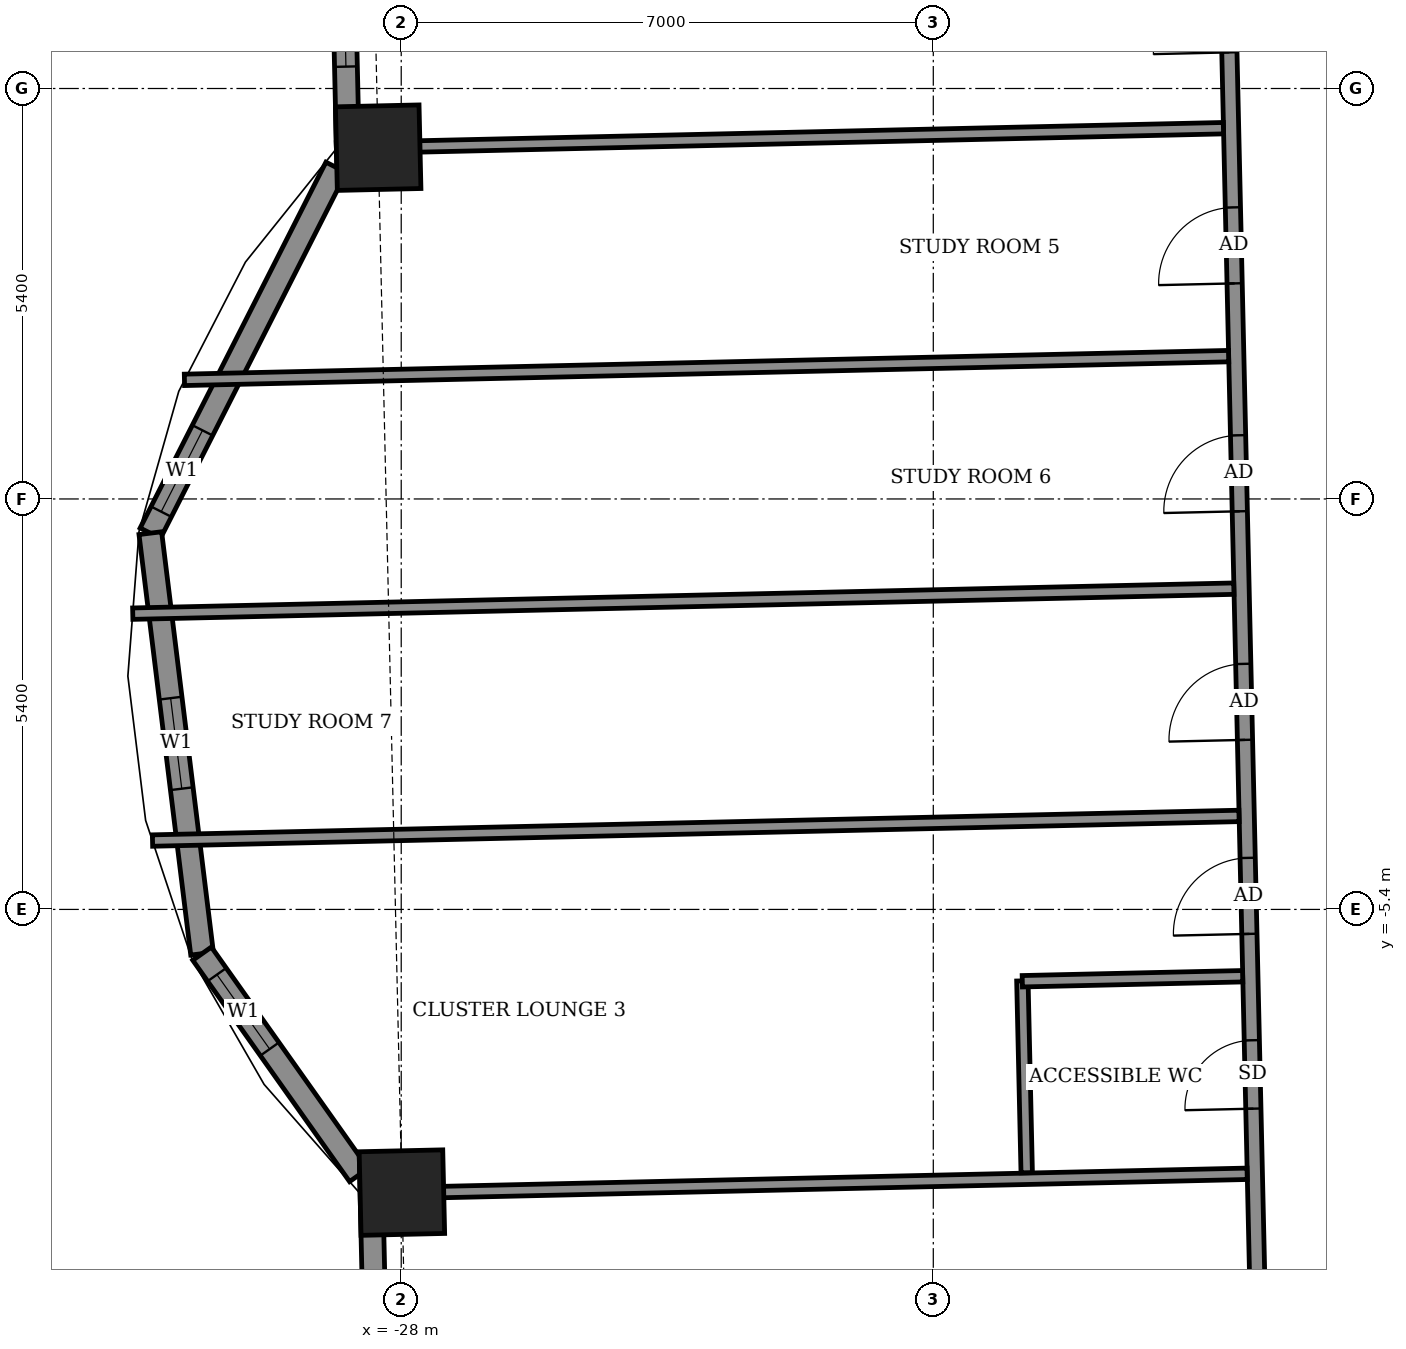
"""IFC4 building model, lengths in metres.
Left out: names, types, materials, properties, quantities, classifications, styles, units other than length and angle.
Written with IfcOpenShell. Run it as: python <this file> out.ifc"""

import sys

from ifc_helpers import new_model, si_unit, direction, frame, frame_2d, origin, origin_2d, place, context, subcontext, project, spatial, rectangle, extrude, element, fill, save


model = new_model("IFC4")
c1 = context("Model", 3, precision=1e-05, world=origin(), true_north=direction((0.0, 1.0)))
c2 = subcontext(c1, "Body", "Model", "MODEL_VIEW")
j1 = project(units=[si_unit("LENGTHUNIT", "METRE"), si_unit("PLANEANGLEUNIT", "RADIAN")], contexts=[c1])
p1 = place(None, origin())
s1 = spatial("IfcSite", under=j1, at=p1, CompositionType="ELEMENT")
p2 = place(p1, origin())
s2 = spatial("IfcBuilding", under=s1, at=p2, CompositionType="ELEMENT")
p3 = place(p2, frame((0.0, 0.0, 238.3)))
s3 = spatial("IfcBuildingStorey", under=s2, at=p3, CompositionType="ELEMENT", Elevation=238.3)
for number, where, z_axis, x_axis in (
    (1, (-27.991, -9.125, -0.55), (0.0, 0.0, 1.0), (0.023, -1.0, 0.0)),
    (2, (-28.303, 4.622, -0.55), (0.0, 0.0, 1.0), (0.023, -1.0, 0.0)),
):
    element("IfcColumn", number, at=place(p3, frame(where, z_axis=z_axis, x_axis=x_axis)), inside=s3, PredefinedType="COLUMN", context=c2, shape_type="SweptSolid", body=[
        extrude(rectangle(XDim=1.1, YDim=1.1, at=origin_2d()), origin(), (0.0, 0.0, 1.0), 3.6),
    ])
p4 = place(p3, frame((-28.979, 16.784, 0.0), z_axis=(0.0, 0.0, 1.0), x_axis=(0.022685159264, -0.999742658662, 0.0)))
e3 = element("IfcWall", 3, at=p4, inside=s3, PredefinedType="SOLIDWALL", context=c2, shape_type="SweptSolid", body=[
    extrude(rectangle(XDim=12.699, YDim=0.3, at=frame_2d((6.35, 0.0))), origin(), (0.0, 0.0, 1.0), 2.55),
])
p5 = place(p4, frame((2.06, 0.0, 0.0)))
e4 = element("IfcOpeningElement", 4, at=p5, cuts=e3, PredefinedType="OPENING", context=c2, shape_type="SweptSolid", body=[
    extrude(rectangle(XDim=1.5, YDim=2.4, at=frame_2d((0.75, 1.2))), frame((0.0, 0.16, 0.0), z_axis=(0.0, -1.0, 0.0), x_axis=(1.0, 0.0, 0.0)), (0.0, 0.0, 1.0), 0.32),
])
p6 = place(p4, frame((7.169, 0.0, 0.9)))
e5 = element("IfcOpeningElement", 5, at=p6, cuts=e3, PredefinedType="OPENING", context=c2, shape_type="SweptSolid", body=[
    extrude(rectangle(XDim=1.2, YDim=1.5, at=frame_2d((0.6, 0.75))), frame((0.0, 0.16, 0.0), z_axis=(0.0, -1.0, 0.0), x_axis=(1.0, 0.0, 0.0)), (0.0, 0.0, 1.0), 0.32),
])
p7 = place(p4, frame((9.899, 0.0, 0.9)))
e6 = element("IfcOpeningElement", 6, at=p7, cuts=e3, PredefinedType="OPENING", context=c2, shape_type="SweptSolid", body=[
    extrude(rectangle(XDim=1.2, YDim=1.5, at=frame_2d((0.6, 0.75))), frame((0.0, 0.16, 0.0), z_axis=(0.0, -1.0, 0.0), x_axis=(1.0, 0.0, 0.0)), (0.0, 0.0, 1.0), 0.32),
])
p8 = place(p3, frame((-28.857, 4.363, 0.0), z_axis=(0.0, 0.0, 1.0), x_axis=(-0.45277700056, -0.891623792731, 0.0)))
e7 = element("IfcWall", 7, at=p8, inside=s3, PredefinedType="SOLIDWALL", context=c2, shape_type="SweptSolid", body=[
    extrude(rectangle(XDim=5.398, YDim=0.3, at=frame_2d((2.699, 0.0))), origin(), (0.0, 0.0, 1.0), 3.05),
])
p9 = place(p8, frame((3.881, 0.0, 0.9)))
e8 = element("IfcOpeningElement", 8, at=p9, cuts=e7, PredefinedType="OPENING", context=c2, shape_type="SweptSolid", body=[
    extrude(rectangle(XDim=1.2, YDim=1.5, at=frame_2d((0.6, 0.75))), frame((0.0, 0.16, 0.0), z_axis=(0.0, -1.0, 0.0), x_axis=(1.0, 0.0, 0.0)), (0.0, 0.0, 1.0), 0.32),
])
p10 = place(p3, frame((-31.301, -0.45, 0.0), z_axis=(0.0, 0.0, 1.0), x_axis=(0.122163831021, -0.992509948761, 0.0)))
e9 = element("IfcWall", 9, at=p10, inside=s3, PredefinedType="SOLIDWALL", context=c2, shape_type="SweptSolid", body=[
    extrude(rectangle(XDim=5.574, YDim=0.3, at=frame_2d((2.787, 0.0))), origin(), (0.0, 0.0, 1.0), 3.05),
])
p11 = place(p10, frame((2.187, 0.0, 0.9)))
e10 = element("IfcOpeningElement", 10, at=p11, cuts=e9, PredefinedType="OPENING", context=c2, shape_type="SweptSolid", body=[
    extrude(rectangle(XDim=1.2, YDim=1.5, at=frame_2d((0.6, 0.75))), frame((0.0, 0.16, 0.0), z_axis=(0.0, -1.0, 0.0), x_axis=(1.0, 0.0, 0.0)), (0.0, 0.0, 1.0), 0.32),
])
p12 = place(p3, frame((-30.62, -5.982, 0.0), z_axis=(0.0, 0.0, 1.0), x_axis=(0.578108441206, -0.815959943996, 0.0)))
e11 = element("IfcWall", 11, at=p12, inside=s3, PredefinedType="SOLIDWALL", context=c2, shape_type="SweptSolid", body=[
    extrude(rectangle(XDim=3.569, YDim=0.3, at=frame_2d((1.784, 0.0))), origin(), (0.0, 0.0, 1.0), 3.05),
])
p13 = place(p12, frame((0.338, 0.0, 0.9)))
e12 = element("IfcOpeningElement", 12, at=p13, cuts=e11, PredefinedType="OPENING", context=c2, shape_type="SweptSolid", body=[
    extrude(rectangle(XDim=1.2, YDim=1.5, at=frame_2d((0.6, 0.75))), frame((0.0, 0.16, 0.0), z_axis=(0.0, -1.0, 0.0), x_axis=(1.0, 0.0, 0.0)), (0.0, 0.0, 1.0), 0.32),
])
p14 = place(p3, frame((-28.403, -8.61, 0.0), z_axis=(0.0, 0.0, 1.0), x_axis=(0.022680342038, -0.999742767958, 0.0)))
e13 = element("IfcWall", 13, at=p14, inside=s3, PredefinedType="SOLIDWALL", context=c2, shape_type="SweptSolid", body=[
    extrude(rectangle(XDim=13.1, YDim=0.3, at=frame_2d((6.55, 0.0))), origin(), (0.0, 0.0, 1.0), 2.55),
])
p15 = place(p14, frame((1.95, 0.0, 0.0)))
e14 = element("IfcOpeningElement", 14, at=p15, cuts=e13, PredefinedType="OPENING", context=c2, shape_type="SweptSolid", body=[
    extrude(rectangle(XDim=1.5, YDim=2.4, at=frame_2d((0.75, 1.2))), frame((0.0, 0.16, 0.0), z_axis=(0.0, -1.0, 0.0), x_axis=(1.0, 0.0, 0.0)), (0.0, 0.0, 1.0), 0.32),
])
p16 = place(p14, frame((8.599, 0.0, 0.9)))
e15 = element("IfcOpeningElement", 15, at=p16, cuts=e13, PredefinedType="OPENING", context=c2, shape_type="SweptSolid", body=[
    extrude(rectangle(XDim=2.4, YDim=1.5, at=frame_2d((1.2, 0.75))), frame((0.0, 0.16, 0.0), z_axis=(0.0, -1.0, 0.0), x_axis=(1.0, 0.0, 0.0)), (0.0, 0.0, 1.0), 0.32),
])
p17 = place(p3, frame((-31.084, -12.322, 0.0), z_axis=(0.0, 0.0, 1.0), x_axis=(-0.022929749512, 0.99973707873, 0.0)))
e16 = element("IfcWall", 16, at=p17, inside=s3, PredefinedType="USERDEFINED", context=c2, shape_type="SweptSolid", body=[
    extrude(rectangle(XDim=2.875, YDim=0.55, at=frame_2d((1.438, 0.0))), origin(), (0.0, 0.0, 1.0), 0.8),
])
p18 = place(p3, frame((-16.678, -12.919, 0.0), z_axis=(0.0, 0.0, 1.0), x_axis=(-0.022696191528, 0.999742408268, 0.0)))
e17 = element("IfcWall", 17, at=p18, inside=s3, PredefinedType="PARTITIONING", context=c2, shape_type="SweptSolid", body=[
    extrude(rectangle(XDim=25.074, YDim=0.2, at=frame_2d((12.537, 0.0))), origin(), (0.0, 0.0, 1.0), 3.05),
])
p19 = place(p18, frame((21.237, 0.0, 0.0)))
e18 = element("IfcOpeningElement", 18, at=p19, cuts=e17, PredefinedType="OPENING", context=c2, shape_type="SweptSolid", body=[
    extrude(rectangle(XDim=1.0, YDim=2.1, at=frame_2d((0.5, 1.05))), frame((0.0, 0.11, 0.0), z_axis=(0.0, -1.0, 0.0), x_axis=(1.0, 0.0, 0.0)), (0.0, 0.0, 1.0), 0.22),
])
p20 = place(p18, frame((23.424, 0.0, 0.0)))
e19 = element("IfcOpeningElement", 19, at=p20, cuts=e17, PredefinedType="OPENING", context=c2, shape_type="SweptSolid", body=[
    extrude(rectangle(XDim=0.9, YDim=2.1, at=frame_2d((0.45, 1.05))), frame((0.0, 0.11, 0.0), z_axis=(0.0, -1.0, 0.0), x_axis=(1.0, 0.0, 0.0)), (0.0, 0.0, 1.0), 0.22),
])
p21 = place(p18, frame((18.799, 0.0, 0.0)))
e20 = element("IfcOpeningElement", 20, at=p21, cuts=e17, PredefinedType="OPENING", context=c2, shape_type="SweptSolid", body=[
    extrude(rectangle(XDim=1.0, YDim=2.1, at=frame_2d((0.5, 1.05))), frame((0.0, 0.11, 0.0), z_axis=(0.0, -1.0, 0.0), x_axis=(1.0, 0.0, 0.0)), (0.0, 0.0, 1.0), 0.22),
])
p22 = place(p18, frame((15.759, 0.0, 0.0)))
e21 = element("IfcOpeningElement", 21, at=p22, cuts=e17, PredefinedType="OPENING", context=c2, shape_type="SweptSolid", body=[
    extrude(rectangle(XDim=1.0, YDim=2.1, at=frame_2d((0.5, 1.05))), frame((0.0, 0.11, 0.0), z_axis=(0.0, -1.0, 0.0), x_axis=(1.0, 0.0, 0.0)), (0.0, 0.0, 1.0), 0.22),
])
p23 = place(p18, frame((12.76, 0.0, 0.0)))
e22 = element("IfcOpeningElement", 22, at=p23, cuts=e17, PredefinedType="OPENING", context=c2, shape_type="SweptSolid", body=[
    extrude(rectangle(XDim=1.0, YDim=2.1, at=frame_2d((0.5, 1.05))), frame((0.0, 0.11, 0.0), z_axis=(0.0, -1.0, 0.0), x_axis=(1.0, 0.0, 0.0)), (0.0, 0.0, 1.0), 0.22),
])
p24 = place(p18, frame((9.752, 0.0, 0.0)))
e23 = element("IfcOpeningElement", 23, at=p24, cuts=e17, PredefinedType="OPENING", context=c2, shape_type="SweptSolid", body=[
    extrude(rectangle(XDim=1.0, YDim=2.1, at=frame_2d((0.5, 1.05))), frame((0.0, 0.11, 0.0), z_axis=(0.0, -1.0, 0.0), x_axis=(1.0, 0.0, 0.0)), (0.0, 0.0, 1.0), 0.22),
])
p25 = place(p18, frame((7.199, 0.0, 0.0)))
e24 = element("IfcOpeningElement", 24, at=p25, cuts=e17, PredefinedType="OPENING", context=c2, shape_type="SweptSolid", body=[
    extrude(rectangle(XDim=1.0, YDim=2.1, at=frame_2d((0.5, 1.05))), frame((0.0, 0.11, 0.0), z_axis=(0.0, -1.0, 0.0), x_axis=(1.0, 0.0, 0.0)), (0.0, 0.0, 1.0), 0.22),
])
p26 = place(p18, frame((4.899, 0.0, 0.0)))
e25 = element("IfcOpeningElement", 25, at=p26, cuts=e17, PredefinedType="OPENING", context=c2, shape_type="SweptSolid", body=[
    extrude(rectangle(XDim=0.9, YDim=2.1, at=frame_2d((0.45, 1.05))), frame((0.0, 0.11, 0.0), z_axis=(0.0, -1.0, 0.0), x_axis=(1.0, 0.0, 0.0)), (0.0, 0.0, 1.0), 0.22),
])
p27 = place(p3, frame((-28.241, -9.136, 0.0), z_axis=(0.0, 0.0, 1.0), x_axis=(0.999742533279, 0.022690684282, 0.0)))
e26 = element("IfcWall", 26, at=p27, inside=s3, PredefinedType="PARTITIONING", context=c2, shape_type="SweptSolid", body=[
    extrude(rectangle(XDim=11.373, YDim=0.15, at=frame_2d((5.687, 0.0))), origin(), (0.0, 0.0, 1.0), 3.05),
])
p28 = place(p3, frame((-19.771, -8.864, 0.0), z_axis=(0.0, 0.0, 1.0), x_axis=(-0.022532486354, 0.9997461113, 0.0)))
e27 = element("IfcWall", 27, at=p28, inside=s3, PredefinedType="PARTITIONING", context=c2, shape_type="SweptSolid", body=[
    extrude(rectangle(XDim=2.525, YDim=0.15, at=frame_2d((1.262, 0.0))), origin(), (0.0, 0.0, 1.0), 3.05),
])
p29 = place(p3, frame((-19.829, -6.345, 0.0), z_axis=(0.0, 0.0, 1.0), x_axis=(0.999741618182, 0.022730967319, 0.0)))
e28 = element("IfcWall", 28, at=p29, inside=s3, PredefinedType="PARTITIONING", context=c2, shape_type="SweptSolid", body=[
    extrude(rectangle(XDim=2.9, YDim=0.15, at=frame_2d((1.45, 0.0))), origin(), (0.0, 0.0, 1.0), 3.05),
])
p30 = place(p3, frame((-31.272, -4.494, 0.0), z_axis=(0.0, 0.0, 1.0), x_axis=(0.999743244098, 0.022659344212, 0.0)))
e29 = element("IfcWall", 29, at=p30, inside=s3, PredefinedType="PARTITIONING", context=c2, shape_type="SweptSolid", body=[
    extrude(rectangle(XDim=14.298, YDim=0.15, at=frame_2d((7.149, 0.0))), origin(), (0.0, 0.0, 1.0), 2.1),
])
p31 = place(p3, frame((-31.532, -1.509, 0.0), z_axis=(0.0, 0.0, 1.0), x_axis=(0.999742035573, 0.022712602409, 0.0)))
e30 = element("IfcWall", 30, at=p31, inside=s3, PredefinedType="PARTITIONING", context=c2, shape_type="SweptSolid", body=[
    extrude(rectangle(XDim=14.49, YDim=0.15, at=frame_2d((7.245, 0.0))), origin(), (0.0, 0.0, 1.0), 2.1),
])
p32 = place(p3, frame((-30.852, 1.567, 0.0), z_axis=(0.0, 0.0, 1.0), x_axis=(0.999742156495, 0.022707279151, 0.0)))
e31 = element("IfcWall", 31, at=p32, inside=s3, PredefinedType="PARTITIONING", context=c2, shape_type="SweptSolid", body=[
    extrude(rectangle(XDim=13.741, YDim=0.15, at=frame_2d((6.87, 0.0))), origin(), (0.0, 0.0, 1.0), 2.1),
])
p33 = place(p3, frame((-28.853, 4.613, 0.0), z_axis=(0.0, 0.0, 1.0), x_axis=(0.999742483, 0.022692899457, 0.0)))
e32 = element("IfcWall", 32, at=p33, inside=s3, PredefinedType="PARTITIONING", context=c2, shape_type="SweptSolid", body=[
    extrude(rectangle(XDim=11.673, YDim=0.15, at=frame_2d((5.836, 0.0))), origin(), (0.0, 0.0, 1.0), 3.05),
])
p34 = place(p7, origin())
e33 = element("IfcWindow", 33, at=p34, inside=s3, PartitioningType="SINGLE_PANEL", PredefinedType="WINDOW", context=c2, shape_type="SweptSolid", body=[
    extrude(rectangle(XDim=1.2, YDim=1.5, at=frame_2d((0.6, 0.75))), frame((0.0, 0.03, 0.0), z_axis=(0.0, -1.0, 0.0), x_axis=(1.0, 0.0, 0.0)), (0.0, 0.0, 1.0), 0.06),
])
fill(e6, e33)
p35 = place(p9, origin())
e34 = element("IfcWindow", 34, at=p35, inside=s3, PartitioningType="SINGLE_PANEL", PredefinedType="WINDOW", context=c2, shape_type="SweptSolid", body=[
    extrude(rectangle(XDim=1.2, YDim=1.5, at=frame_2d((0.6, 0.75))), frame((0.0, 0.03, 0.0), z_axis=(0.0, -1.0, 0.0), x_axis=(1.0, 0.0, 0.0)), (0.0, 0.0, 1.0), 0.06),
])
fill(e8, e34)
p36 = place(p11, origin())
e35 = element("IfcWindow", 35, at=p36, inside=s3, PartitioningType="SINGLE_PANEL", PredefinedType="WINDOW", context=c2, shape_type="SweptSolid", body=[
    extrude(rectangle(XDim=1.2, YDim=1.5, at=frame_2d((0.6, 0.75))), frame((0.0, 0.03, 0.0), z_axis=(0.0, -1.0, 0.0), x_axis=(1.0, 0.0, 0.0)), (0.0, 0.0, 1.0), 0.06),
])
fill(e10, e35)
p37 = place(p13, origin())
e36 = element("IfcWindow", 36, at=p37, inside=s3, PartitioningType="SINGLE_PANEL", PredefinedType="WINDOW", context=c2, shape_type="SweptSolid", body=[
    extrude(rectangle(XDim=1.2, YDim=1.5, at=frame_2d((0.6, 0.75))), frame((0.0, 0.03, 0.0), z_axis=(0.0, -1.0, 0.0), x_axis=(1.0, 0.0, 0.0)), (0.0, 0.0, 1.0), 0.06),
])
fill(e12, e36)
p38 = place(p21, origin())
e37 = element("IfcDoor", 37, at=p38, inside=s3, OperationType="SINGLE_SWING_RIGHT", PredefinedType="DOOR", context=c2, shape_type="SweptSolid", body=[
    extrude(rectangle(XDim=1.0, YDim=2.1, at=frame_2d((0.5, 1.05))), frame((0.0, 0.025, 0.0), z_axis=(0.0, -1.0, 0.0), x_axis=(1.0, 0.0, 0.0)), (0.0, 0.0, 1.0), 0.05),
])
fill(e20, e37)
p39 = place(p22, origin())
e38 = element("IfcDoor", 38, at=p39, inside=s3, OperationType="SINGLE_SWING_LEFT", PredefinedType="DOOR", context=c2, shape_type="SweptSolid", body=[
    extrude(rectangle(XDim=1.0, YDim=2.1, at=frame_2d((0.5, 1.05))), frame((0.0, 0.025, 0.0), z_axis=(0.0, -1.0, 0.0), x_axis=(1.0, 0.0, 0.0)), (0.0, 0.0, 1.0), 0.05),
])
fill(e21, e38)
p40 = place(p23, origin())
e39 = element("IfcDoor", 39, at=p40, inside=s3, OperationType="SINGLE_SWING_RIGHT", PredefinedType="DOOR", context=c2, shape_type="SweptSolid", body=[
    extrude(rectangle(XDim=1.0, YDim=2.1, at=frame_2d((0.5, 1.05))), frame((0.0, 0.025, 0.0), z_axis=(0.0, -1.0, 0.0), x_axis=(1.0, 0.0, 0.0)), (0.0, 0.0, 1.0), 0.05),
])
fill(e22, e39)
p41 = place(p24, origin())
e40 = element("IfcDoor", 40, at=p41, inside=s3, OperationType="SINGLE_SWING_LEFT", PredefinedType="DOOR", context=c2, shape_type="SweptSolid", body=[
    extrude(rectangle(XDim=1.0, YDim=2.1, at=frame_2d((0.5, 1.05))), frame((0.0, 0.025, 0.0), z_axis=(0.0, -1.0, 0.0), x_axis=(1.0, 0.0, 0.0)), (0.0, 0.0, 1.0), 0.05),
])
fill(e23, e40)
p42 = place(p25, origin())
e41 = element("IfcDoor", 41, at=p42, inside=s3, OperationType="SINGLE_SWING_RIGHT", PredefinedType="DOOR", context=c2, shape_type="SweptSolid", body=[
    extrude(rectangle(XDim=1.0, YDim=2.1, at=frame_2d((0.5, 1.05))), frame((0.0, 0.025, 0.0), z_axis=(0.0, -1.0, 0.0), x_axis=(1.0, 0.0, 0.0)), (0.0, 0.0, 1.0), 0.05),
])
fill(e24, e41)
p43 = place(p26, origin())
e42 = element("IfcDoor", 42, at=p43, inside=s3, OperationType="SINGLE_SWING_LEFT", PredefinedType="DOOR", context=c2, shape_type="SweptSolid", body=[
    extrude(rectangle(XDim=0.9, YDim=2.1, at=frame_2d((0.45, 1.05))), frame((0.0, 0.025, 0.0), z_axis=(0.0, -1.0, 0.0), x_axis=(1.0, 0.0, 0.0)), (0.0, 0.0, 1.0), 0.05),
])
fill(e25, e42)
save(model, sys.argv[1])
